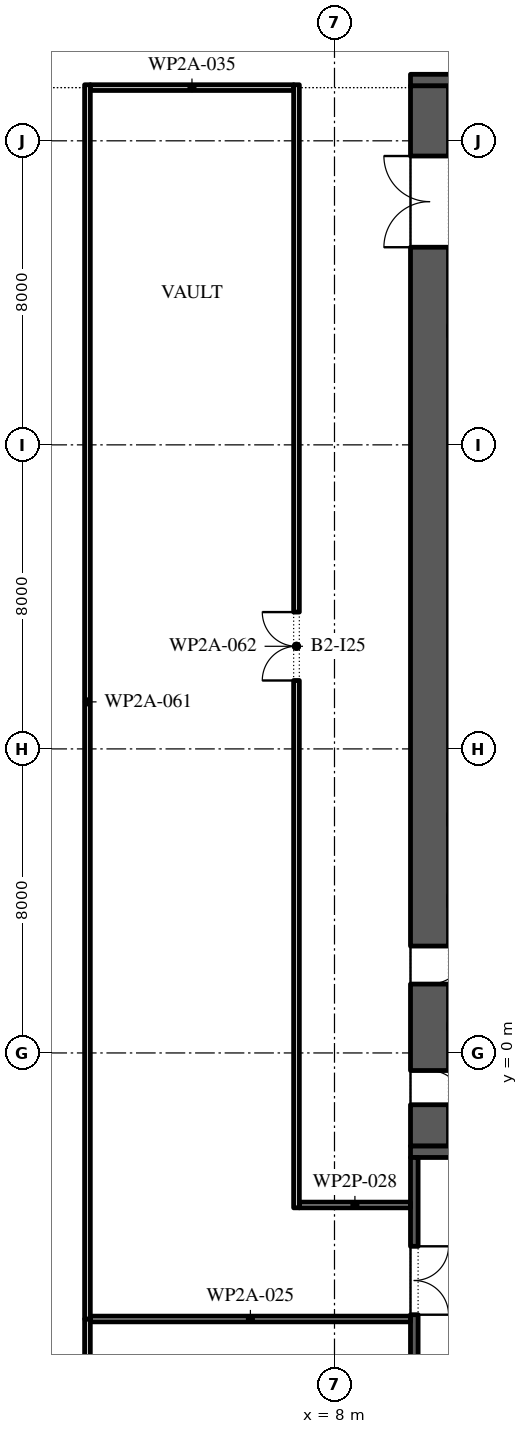
"""IFC4 building model, lengths in metres.
Left out: names, types, materials, properties, quantities, classifications, styles, units other than length and angle.
Written with IfcOpenShell. Run it as: python <this file> out.ifc"""

import sys

from ifc_helpers import new_model, si_unit, direction, frame, frame_2d, origin, place, context, subcontext, project, spatial, rectangle, extrude, element, fill, save


model = new_model("IFC4")
c1 = context("Model", 3, precision=1e-05, world=origin(), true_north=direction((0.0, 1.0)))
c2 = subcontext(c1, "Body", "Model", "MODEL_VIEW")
j1 = project(units=[si_unit("LENGTHUNIT", "METRE"), si_unit("PLANEANGLEUNIT", "RADIAN")], contexts=[c1])
p1 = place(None, origin())
s1 = spatial("IfcSite", under=j1, at=p1, CompositionType="ELEMENT")
p2 = place(p1, origin())
s2 = spatial("IfcBuilding", under=s1, at=p2, CompositionType="ELEMENT")
p3 = place(p2, frame((0.0, 0.0, -10.4)))
s3 = spatial("IfcBuildingStorey", under=s2, at=p3, CompositionType="ELEMENT", Elevation=-10.4)
p4 = place(p3, frame((10.5, -2.45, 0.0), z_axis=(0.0, 0.0, 1.0), x_axis=(0.0, 1.0, 0.0)))
e1 = element("IfcWall", 1, at=p4, inside=s3, PredefinedType="SHEAR", context=c2, shape_type="SweptSolid", body=[
    extrude(rectangle(XDim=27.9, YDim=1.0, at=frame_2d((13.95, 0.0))), origin(), (0.0, 0.0, 1.0), 4.9),
])
p5 = place(p4, frame((23.65, 0.0, 0.0)))
e2 = element("IfcOpeningElement", 2, at=p5, cuts=e1, PredefinedType="OPENING", context=c2, shape_type="SweptSolid", body=[
    extrude(rectangle(XDim=2.4, YDim=2.1, at=frame_2d((1.2, 1.05))), frame((0.0, 0.51, 0.0), z_axis=(0.0, -1.0, 0.0), x_axis=(1.0, 0.0, 0.0)), (0.0, 0.0, 1.0), 1.02),
])
p6 = place(p4, frame((1.087, 0.0, 0.0)))
e3 = element("IfcOpeningElement", 3, at=p6, cuts=e1, PredefinedType="OPENING", context=c2, shape_type="SweptSolid", body=[
    extrude(rectangle(XDim=0.9, YDim=2.1, at=frame_2d((0.45, 1.05))), frame((0.0, 0.51, 0.0), z_axis=(0.0, -1.0, 0.0), x_axis=(1.0, 0.0, 0.0)), (0.0, 0.0, 1.0), 1.02),
])
p7 = place(p4, frame((4.262, 0.0, 0.0)))
e4 = element("IfcOpeningElement", 4, at=p7, cuts=e1, PredefinedType="OPENING", context=c2, shape_type="SweptSolid", body=[
    extrude(rectangle(XDim=1.0, YDim=2.1, at=frame_2d((0.5, 1.05))), frame((0.0, 0.51, 0.0), z_axis=(0.0, -1.0, 0.0), x_axis=(1.0, 0.0, 0.0)), (0.0, 0.0, 1.0), 1.02),
])
for number, where, z_axis, x_axis in (
    (5, (10.0, -2.6, 0.0), (0.0, 0.0, 1.0), (1.0, 0.0, 0.0)),
    (6, (10.0, 25.6, 0.0), (0.0, 0.0, 1.0), (1.0, 0.0, 0.0)),
):
    element("IfcWall", number, at=place(p3, frame(where, z_axis=z_axis, x_axis=x_axis)), inside=s3, PredefinedType="SHEAR", context=c2, shape_type="SweptSolid", body=[
        extrude(rectangle(XDim=12.0, YDim=0.3, at=frame_2d((6.0, 0.0))), origin(), (0.0, 0.0, 1.0), 4.9),
    ])
p8 = place(p3, frame((10.1, -15.8, 0.0), z_axis=(0.0, 0.0, 1.0), x_axis=(0.0, 1.0, 0.0)))
e7 = element("IfcWall", 7, at=p8, inside=s3, PredefinedType="SHEAR", context=c2, shape_type="SweptSolid", body=[
    extrude(rectangle(XDim=13.05, YDim=0.2, at=frame_2d((6.525, 0.0))), origin(), (0.0, 0.0, 1.0), 4.9),
])
p9 = place(p8, frame((2.312, 0.0, 0.0)))
e8 = element("IfcOpeningElement", 8, at=p9, cuts=e7, PredefinedType="OPENING", context=c2, shape_type="SweptSolid", body=[
    extrude(rectangle(XDim=1.8, YDim=2.4, at=frame_2d((0.9, 1.2))), frame((0.0, 0.11, 0.0), z_axis=(0.0, -1.0, 0.0), x_axis=(1.0, 0.0, 0.0)), (0.0, 0.0, 1.0), 0.22),
])
p10 = place(p8, frame((8.913, 0.0, 0.0)))
e9 = element("IfcOpeningElement", 9, at=p10, cuts=e7, PredefinedType="OPENING", context=c2, shape_type="SweptSolid", body=[
    extrude(rectangle(XDim=1.8, YDim=2.4, at=frame_2d((0.9, 1.2))), frame((0.0, 0.11, 0.0), z_axis=(0.0, -1.0, 0.0), x_axis=(1.0, 0.0, 0.0)), (0.0, 0.0, 1.0), 0.22),
])
p11 = place(p3, frame((1.575, -7.0, 0.0), z_axis=(0.0, 0.0, 1.0), x_axis=(1.0, 0.0, 0.0)))
e10 = element("IfcWall", 10, at=p11, inside=s3, PredefinedType="PARTITIONING", context=c2, shape_type="SweptSolid", body=[
    extrude(rectangle(XDim=8.425, YDim=0.15, at=frame_2d((4.212, 0.0))), origin(), (0.0, 0.0, 1.0), 4.9),
])
p12 = place(p3, frame((7.075, -4.0, 0.0), z_axis=(0.0, 0.0, 1.0), x_axis=(1.0, 0.0, 0.0)))
e11 = element("IfcWall", 11, at=p12, inside=s3, PredefinedType="PARTITIONING", context=c2, shape_type="SweptSolid", body=[
    extrude(rectangle(XDim=2.925, YDim=0.15, at=frame_2d((1.462, 0.0))), origin(), (0.0, 0.0, 1.0), 3.93),
])
p13 = place(p3, frame((1.575, 25.4, 0.0), z_axis=(0.0, 0.0, 1.0), x_axis=(1.0, 0.0, 0.0)))
e12 = element("IfcWall", 12, at=p13, inside=s3, PredefinedType="PARTITIONING", context=c2, shape_type="SweptSolid", body=[
    extrude(rectangle(XDim=5.35, YDim=0.15, at=frame_2d((2.675, 0.0))), origin(), (0.0, 0.0, 1.0), 4.9),
])
p14 = place(p3, frame((1.5, -20.0, 0.0), z_axis=(0.0, 0.0, 1.0), x_axis=(0.0, 1.0, 0.0)))
e13 = element("IfcWall", 13, at=p14, inside=s3, PredefinedType="PARTITIONING", context=c2, shape_type="SweptSolid", body=[
    extrude(rectangle(XDim=13.0, YDim=0.15, at=frame_2d((6.5, 0.0))), origin(), (0.0, 0.0, 1.0), 4.9),
])
p15 = place(p14, frame((6.0, 0.0, 0.0)))
e14 = element("IfcOpeningElement", 14, at=p15, cuts=e13, PredefinedType="OPENING", context=c2, shape_type="SweptSolid", body=[
    extrude(rectangle(XDim=1.0, YDim=2.1, at=frame_2d((0.5, 1.05))), frame((0.0, 0.085, 0.0), z_axis=(0.0, -1.0, 0.0), x_axis=(1.0, 0.0, 0.0)), (0.0, 0.0, 1.0), 0.17),
])
p16 = place(p3, frame((1.5, -7.0, 0.0), z_axis=(0.0, 0.0, 1.0), x_axis=(0.0, 1.0, 0.0)))
e15 = element("IfcWall", 15, at=p16, inside=s3, PredefinedType="PARTITIONING", context=c2, shape_type="SweptSolid", body=[
    extrude(rectangle(XDim=32.475, YDim=0.15, at=frame_2d((16.238, 0.0))), origin(), (0.0, 0.0, 1.0), 4.9),
])
p17 = place(p3, frame((7.0, -4.075, 0.0), z_axis=(0.0, 0.0, 1.0), x_axis=(0.0, 1.0, 0.0)))
e16 = element("IfcWall", 16, at=p17, inside=s3, PredefinedType="PARTITIONING", context=c2, shape_type="SweptSolid", body=[
    extrude(rectangle(XDim=29.55, YDim=0.15, at=frame_2d((14.775, 0.0))), origin(), (0.0, 0.0, 1.0), 4.9),
])
p18 = place(p17, frame((13.875, 0.0, 0.0)))
e17 = element("IfcOpeningElement", 17, at=p18, cuts=e16, PredefinedType="OPENING", context=c2, shape_type="SweptSolid", body=[
    extrude(rectangle(XDim=1.8, YDim=2.1, at=frame_2d((0.9, 1.05))), frame((0.0, 0.085, 0.0), z_axis=(0.0, -1.0, 0.0), x_axis=(1.0, 0.0, 0.0)), (0.0, 0.0, 1.0), 0.17),
])
p19 = place(p5, origin())
e18 = element("IfcDoor", 18, at=p19, inside=s3, OperationType="DOUBLE_DOOR_SINGLE_SWING", PredefinedType="DOOR", context=c2, shape_type="SweptSolid", body=[
    extrude(rectangle(XDim=2.4, YDim=2.1, at=frame_2d((1.2, 1.05))), frame((0.0, 0.025, 0.0), z_axis=(0.0, -1.0, 0.0), x_axis=(1.0, 0.0, 0.0)), (0.0, 0.0, 1.0), 0.05),
])
fill(e2, e18)
p20 = place(p6, frame((0.9, -0.95, 0.0), z_axis=(0.0, 0.0, 1.0), x_axis=(-1.0, 0.0, 0.0)))
e19 = element("IfcDoor", 19, at=p20, inside=s3, OperationType="SINGLE_SWING_LEFT", PredefinedType="DOOR", context=c2, shape_type="SweptSolid", body=[
    extrude(rectangle(XDim=0.9, YDim=2.1, at=frame_2d((0.45, 1.05))), frame((0.0, -0.45, 0.0), z_axis=(0.0, -1.0, 0.0), x_axis=(1.0, 0.0, 0.0)), (0.0, 0.0, 1.0), 0.05),
])
fill(e3, e19)
p21 = place(p7, frame((1.0, -0.95, 0.0), z_axis=(0.0, 0.0, 1.0), x_axis=(-1.0, 0.0, 0.0)))
e20 = element("IfcDoor", 20, at=p21, inside=s3, OperationType="SINGLE_SWING_RIGHT", PredefinedType="DOOR", context=c2, shape_type="SweptSolid", body=[
    extrude(rectangle(XDim=1.0, YDim=2.1, at=frame_2d((0.5, 1.05))), frame((0.0, -0.45, 0.0), z_axis=(0.0, -1.0, 0.0), x_axis=(1.0, 0.0, 0.0)), (0.0, 0.0, 1.0), 0.05),
])
fill(e4, e20)
p22 = place(p10, frame((1.8, -0.15, 0.0), z_axis=(0.0, 0.0, 1.0), x_axis=(-1.0, 0.0, 0.0)))
e21 = element("IfcDoor", 21, at=p22, inside=s3, OperationType="DOUBLE_DOOR_SINGLE_SWING", PredefinedType="DOOR", context=c2, shape_type="SweptSolid", body=[
    extrude(rectangle(XDim=1.8, YDim=2.4, at=frame_2d((0.9, 1.2))), frame((0.0, -0.05, 0.0), z_axis=(0.0, -1.0, 0.0), x_axis=(1.0, 0.0, 0.0)), (0.0, 0.0, 1.0), 0.05),
])
fill(e9, e21)
p23 = place(p18, origin())
e22 = element("IfcDoor", 22, at=p23, inside=s3, OperationType="SINGLE_SWING_RIGHT", PredefinedType="DOOR", context=c2, shape_type="SweptSolid", body=[
    extrude(rectangle(XDim=1.8, YDim=2.1, at=frame_2d((0.9, 1.05))), frame((0.0, 0.025, 0.0), z_axis=(0.0, -1.0, 0.0), x_axis=(1.0, 0.0, 0.0)), (0.0, 0.0, 1.0), 0.05),
])
fill(e17, e22)
save(model, sys.argv[1])
